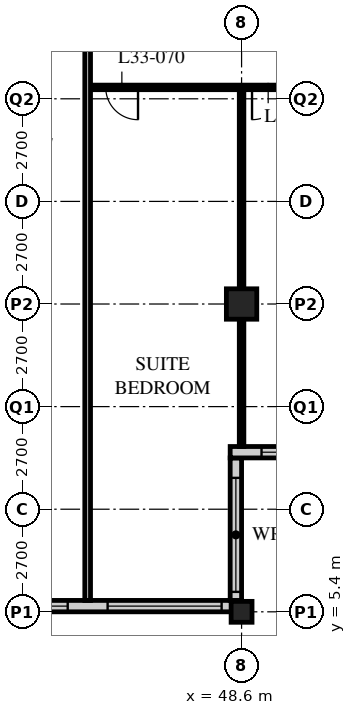
"""IFC4 building model, lengths in metres.
Left out: names, types, materials, properties, quantities, classifications, styles, units other than length and angle.
Written with IfcOpenShell. Run it as: python <this file> out.ifc"""

import sys

from ifc_helpers import new_model, si_unit, direction, frame, frame_2d, origin, origin_2d, place, context, subcontext, project, spatial, rectangle, hollow_rectangle, extrude, element, fill, save


model = new_model("IFC4")
c1 = context("Model", 3, precision=1e-05, world=origin(), true_north=direction((0.0, 1.0)))
c2 = subcontext(c1, "Body", "Model", "MODEL_VIEW")
j1 = project(units=[si_unit("LENGTHUNIT", "METRE"), si_unit("PLANEANGLEUNIT", "RADIAN")], contexts=[c1])
p1 = place(None, origin())
s1 = spatial("IfcSite", under=j1, at=p1, CompositionType="ELEMENT")
p2 = place(p1, origin())
s2 = spatial("IfcBuilding", under=s1, at=p2, CompositionType="ELEMENT")
p3 = place(p2, frame((0.0, 0.0, 130.6)))
s3 = spatial("IfcBuildingStorey", under=s2, at=p3, CompositionType="ELEMENT", Elevation=130.6)
p4 = place(p3, frame((48.6, 5.4, 0.0), z_axis=(0.0, 0.0, 1.0), x_axis=(1.0, 0.0, 0.0)))
e1 = element("IfcColumn", 1, at=p4, inside=s3, PredefinedType="COLUMN", context=c2, shape_type="SweptSolid", body=[
    extrude(hollow_rectangle(XDim=0.55, YDim=0.55, WallThickness=0.04, at=origin_2d()), origin(), (0.0, 0.0, 1.0), 3.4),
])
p5 = place(p3, frame((48.6, 13.5, 0.0), z_axis=(0.0, 0.0, 1.0), x_axis=(1.0, 0.0, 0.0)))
e2 = element("IfcColumn", 2, at=p5, inside=s3, PredefinedType="COLUMN", context=c2, shape_type="SweptSolid", body=[
    extrude(hollow_rectangle(XDim=0.8, YDim=0.8, WallThickness=0.08, at=origin_2d()), origin(), (0.0, 0.0, 1.0), 3.4),
])
p6 = place(p3, frame((8.4, 5.55, 0.0), z_axis=(0.0, 0.0, 1.0), x_axis=(1.0, 0.0, 0.0)))
e3 = element("IfcWall", 3, at=p6, inside=s3, PredefinedType="SOLIDWALL", context=c2, shape_type="SweptSolid", body=[
    extrude(rectangle(XDim=40.2, YDim=0.3, at=frame_2d((20.1, 0.0))), origin(), (0.0, 0.0, 1.0), 3.19),
])
p7 = place(p6, frame((0.225, 0.0, 0.9)))
e4 = element("IfcOpeningElement", 4, at=p7, cuts=e3, PredefinedType="OPENING", context=c2, shape_type="SweptSolid", body=[
    extrude(rectangle(XDim=3.0, YDim=2.0, at=frame_2d((1.5, 1.0))), frame((0.0, 0.16, 0.0), z_axis=(0.0, -1.0, 0.0), x_axis=(1.0, 0.0, 0.0)), (0.0, 0.0, 1.0), 0.32),
])
p8 = place(p6, frame((4.275, 0.0, 0.9)))
e5 = element("IfcOpeningElement", 5, at=p8, cuts=e3, PredefinedType="OPENING", context=c2, shape_type="SweptSolid", body=[
    extrude(rectangle(XDim=3.0, YDim=2.0, at=frame_2d((1.5, 1.0))), frame((0.0, 0.16, 0.0), z_axis=(0.0, -1.0, 0.0), x_axis=(1.0, 0.0, 0.0)), (0.0, 0.0, 1.0), 0.32),
])
p9 = place(p6, frame((8.325, 0.0, 0.9)))
e6 = element("IfcOpeningElement", 6, at=p9, cuts=e3, PredefinedType="OPENING", context=c2, shape_type="SweptSolid", body=[
    extrude(rectangle(XDim=3.0, YDim=2.0, at=frame_2d((1.5, 1.0))), frame((0.0, 0.16, 0.0), z_axis=(0.0, -1.0, 0.0), x_axis=(1.0, 0.0, 0.0)), (0.0, 0.0, 1.0), 0.32),
])
p10 = place(p6, frame((12.375, 0.0, 0.9)))
e7 = element("IfcOpeningElement", 7, at=p10, cuts=e3, PredefinedType="OPENING", context=c2, shape_type="SweptSolid", body=[
    extrude(rectangle(XDim=3.0, YDim=2.0, at=frame_2d((1.5, 1.0))), frame((0.0, 0.16, 0.0), z_axis=(0.0, -1.0, 0.0), x_axis=(1.0, 0.0, 0.0)), (0.0, 0.0, 1.0), 0.32),
])
p11 = place(p6, frame((16.425, 0.0, 0.9)))
e8 = element("IfcOpeningElement", 8, at=p11, cuts=e3, PredefinedType="OPENING", context=c2, shape_type="SweptSolid", body=[
    extrude(rectangle(XDim=3.0, YDim=2.0, at=frame_2d((1.5, 1.0))), frame((0.0, 0.16, 0.0), z_axis=(0.0, -1.0, 0.0), x_axis=(1.0, 0.0, 0.0)), (0.0, 0.0, 1.0), 0.32),
])
p12 = place(p6, frame((20.475, 0.0, 0.9)))
e9 = element("IfcOpeningElement", 9, at=p12, cuts=e3, PredefinedType="OPENING", context=c2, shape_type="SweptSolid", body=[
    extrude(rectangle(XDim=3.0, YDim=2.0, at=frame_2d((1.5, 1.0))), frame((0.0, 0.16, 0.0), z_axis=(0.0, -1.0, 0.0), x_axis=(1.0, 0.0, 0.0)), (0.0, 0.0, 1.0), 0.32),
])
p13 = place(p6, frame((24.525, 0.0, 0.9)))
e10 = element("IfcOpeningElement", 10, at=p13, cuts=e3, PredefinedType="OPENING", context=c2, shape_type="SweptSolid", body=[
    extrude(rectangle(XDim=3.0, YDim=2.0, at=frame_2d((1.5, 1.0))), frame((0.0, 0.16, 0.0), z_axis=(0.0, -1.0, 0.0), x_axis=(1.0, 0.0, 0.0)), (0.0, 0.0, 1.0), 0.32),
])
p14 = place(p6, frame((28.575, 0.0, 0.9)))
e11 = element("IfcOpeningElement", 11, at=p14, cuts=e3, PredefinedType="OPENING", context=c2, shape_type="SweptSolid", body=[
    extrude(rectangle(XDim=3.0, YDim=2.0, at=frame_2d((1.5, 1.0))), frame((0.0, 0.16, 0.0), z_axis=(0.0, -1.0, 0.0), x_axis=(1.0, 0.0, 0.0)), (0.0, 0.0, 1.0), 0.32),
])
p15 = place(p6, frame((32.625, 0.0, 0.9)))
e12 = element("IfcOpeningElement", 12, at=p15, cuts=e3, PredefinedType="OPENING", context=c2, shape_type="SweptSolid", body=[
    extrude(rectangle(XDim=3.0, YDim=2.0, at=frame_2d((1.5, 1.0))), frame((0.0, 0.16, 0.0), z_axis=(0.0, -1.0, 0.0), x_axis=(1.0, 0.0, 0.0)), (0.0, 0.0, 1.0), 0.32),
])
p16 = place(p6, frame((36.675, 0.0, 0.9)))
e13 = element("IfcOpeningElement", 13, at=p16, cuts=e3, PredefinedType="OPENING", context=c2, shape_type="SweptSolid", body=[
    extrude(rectangle(XDim=3.0, YDim=2.0, at=frame_2d((1.5, 1.0))), frame((0.0, 0.16, 0.0), z_axis=(0.0, -1.0, 0.0), x_axis=(1.0, 0.0, 0.0)), (0.0, 0.0, 1.0), 0.32),
])
p17 = place(p3, frame((48.45, 5.7, 0.0), z_axis=(0.0, 0.0, 1.0), x_axis=(0.0, 1.0, 0.0)))
e14 = element("IfcWall", 14, at=p17, inside=s3, PredefinedType="SOLIDWALL", context=c2, shape_type="SweptSolid", body=[
    extrude(rectangle(XDim=3.75, YDim=0.3, at=frame_2d((1.875, 0.0))), origin(), (0.0, 0.0, 1.0), 3.19),
])
p18 = place(p17, frame((0.225, 0.0, 0.9)))
e15 = element("IfcOpeningElement", 15, at=p18, cuts=e14, PredefinedType="OPENING", context=c2, shape_type="SweptSolid", body=[
    extrude(rectangle(XDim=3.0, YDim=1.5, at=frame_2d((1.5, 0.75))), frame((0.0, 0.16, 0.0), z_axis=(0.0, -1.0, 0.0), x_axis=(1.0, 0.0, 0.0)), (0.0, 0.0, 1.0), 0.32),
])
p19 = place(p3, frame((48.3, 9.6, 0.0), z_axis=(0.0, 0.0, 1.0), x_axis=(1.0, 0.0, 0.0)))
e16 = element("IfcWall", 16, at=p19, inside=s3, PredefinedType="SOLIDWALL", context=c2, shape_type="SweptSolid", body=[
    extrude(rectangle(XDim=4.35, YDim=0.3, at=frame_2d((2.175, 0.0))), origin(), (0.0, 0.0, 1.0), 3.19),
])
p20 = place(p19, frame((0.825, 0.0, 0.9)))
e17 = element("IfcOpeningElement", 17, at=p20, cuts=e16, PredefinedType="OPENING", context=c2, shape_type="SweptSolid", body=[
    extrude(rectangle(XDim=3.0, YDim=1.5, at=frame_2d((1.5, 0.75))), frame((0.0, 0.16, 0.0), z_axis=(0.0, -1.0, 0.0), x_axis=(1.0, 0.0, 0.0)), (0.0, 0.0, 1.0), 0.32),
])
p21 = place(p3, frame((44.55, 19.2, 0.0), z_axis=(0.0, 0.0, 1.0), x_axis=(1.0, 0.0, 0.0)))
e18 = element("IfcWall", 18, at=p21, inside=s3, PredefinedType="PARTITIONING", context=c2, shape_type="SweptSolid", body=[
    extrude(rectangle(XDim=8.05, YDim=0.12, at=frame_2d((4.025, 0.0))), origin(), (0.0, 0.0, 1.0), 3.19),
])
p22 = place(p21, frame((0.475, 0.0, 0.0)))
e19 = element("IfcOpeningElement", 19, at=p22, cuts=e18, PredefinedType="OPENING", context=c2, shape_type="SweptSolid", body=[
    extrude(rectangle(XDim=0.85, YDim=2.1, at=frame_2d((0.425, 1.05))), frame((0.0, 0.07, 0.0), z_axis=(0.0, -1.0, 0.0), x_axis=(1.0, 0.0, 0.0)), (0.0, 0.0, 1.0), 0.14),
])
p23 = place(p21, frame((4.325, 0.0, 0.0)))
e20 = element("IfcOpeningElement", 20, at=p23, cuts=e18, PredefinedType="OPENING", context=c2, shape_type="SweptSolid", body=[
    extrude(rectangle(XDim=0.85, YDim=2.1, at=frame_2d((0.425, 1.05))), frame((0.0, 0.07, 0.0), z_axis=(0.0, -1.0, 0.0), x_axis=(1.0, 0.0, 0.0)), (0.0, 0.0, 1.0), 0.14),
])
p24 = place(p3, frame((48.6, 19.2, 0.0), z_axis=(0.0, 0.0, 1.0), x_axis=(0.0, -1.0, 0.0)))
e21 = element("IfcWall", 21, at=p24, inside=s3, PredefinedType="PARTITIONING", context=c2, shape_type="SweptSolid", body=[
    extrude(rectangle(XDim=9.45, YDim=0.12, at=frame_2d((4.725, 0.0))), origin(), (0.0, 0.0, 1.0), 2.578),
])
p25 = place(p3, frame((44.55, 21.6, 0.0), z_axis=(0.0, 0.0, 1.0), x_axis=(0.0, -1.0, 0.0)))
e22 = element("IfcWall", 22, at=p25, inside=s3, PredefinedType="PARTITIONING", context=c2, shape_type="SweptSolid", body=[
    extrude(rectangle(XDim=15.9, YDim=0.15, at=frame_2d((7.95, 0.0))), origin(), (0.0, 0.0, 1.0), 3.19),
])
p26 = place(p15, origin())
e23 = element("IfcWindow", 23, at=p26, inside=s3, PartitioningType="SINGLE_PANEL", PredefinedType="WINDOW", context=c2, shape_type="SweptSolid", body=[
    extrude(rectangle(XDim=3.0, YDim=2.0, at=frame_2d((1.5, 1.0))), frame((0.0, 0.03, 0.0), z_axis=(0.0, -1.0, 0.0), x_axis=(1.0, 0.0, 0.0)), (0.0, 0.0, 1.0), 0.06),
])
fill(e12, e23)
p27 = place(p16, origin())
e24 = element("IfcWindow", 24, at=p27, inside=s3, PartitioningType="SINGLE_PANEL", PredefinedType="WINDOW", context=c2, shape_type="SweptSolid", body=[
    extrude(rectangle(XDim=3.0, YDim=2.0, at=frame_2d((1.5, 1.0))), frame((0.0, 0.03, 0.0), z_axis=(0.0, -1.0, 0.0), x_axis=(1.0, 0.0, 0.0)), (0.0, 0.0, 1.0), 0.06),
])
fill(e13, e24)
p28 = place(p18, origin())
e25 = element("IfcWindow", 25, at=p28, inside=s3, PartitioningType="SINGLE_PANEL", PredefinedType="WINDOW", context=c2, shape_type="SweptSolid", body=[
    extrude(rectangle(XDim=3.0, YDim=1.5, at=frame_2d((1.5, 0.75))), frame((0.0, 0.03, 0.0), z_axis=(0.0, -1.0, 0.0), x_axis=(1.0, 0.0, 0.0)), (0.0, 0.0, 1.0), 0.06),
])
fill(e15, e25)
p29 = place(p20, origin())
e26 = element("IfcWindow", 26, at=p29, inside=s3, PartitioningType="SINGLE_PANEL", PredefinedType="WINDOW", context=c2, shape_type="SweptSolid", body=[
    extrude(rectangle(XDim=3.0, YDim=1.5, at=frame_2d((1.5, 0.75))), frame((0.0, 0.03, 0.0), z_axis=(0.0, -1.0, 0.0), x_axis=(1.0, 0.0, 0.0)), (0.0, 0.0, 1.0), 0.06),
])
fill(e17, e26)
p30 = place(p22, origin())
e27 = element("IfcDoor", 27, at=p30, inside=s3, OperationType="SINGLE_SWING_LEFT", PredefinedType="DOOR", context=c2, shape_type="SweptSolid", body=[
    extrude(rectangle(XDim=0.85, YDim=2.1, at=frame_2d((0.425, 1.05))), frame((0.0, 0.025, 0.0), z_axis=(0.0, -1.0, 0.0), x_axis=(1.0, 0.0, 0.0)), (0.0, 0.0, 1.0), 0.05),
])
fill(e19, e27)
p31 = place(p23, origin())
e28 = element("IfcDoor", 28, at=p31, inside=s3, OperationType="SINGLE_SWING_RIGHT", PredefinedType="DOOR", context=c2, shape_type="SweptSolid", body=[
    extrude(rectangle(XDim=0.85, YDim=2.1, at=frame_2d((0.425, 1.05))), frame((0.0, 0.025, 0.0), z_axis=(0.0, -1.0, 0.0), x_axis=(1.0, 0.0, 0.0)), (0.0, 0.0, 1.0), 0.05),
])
fill(e20, e28)
save(model, sys.argv[1])
